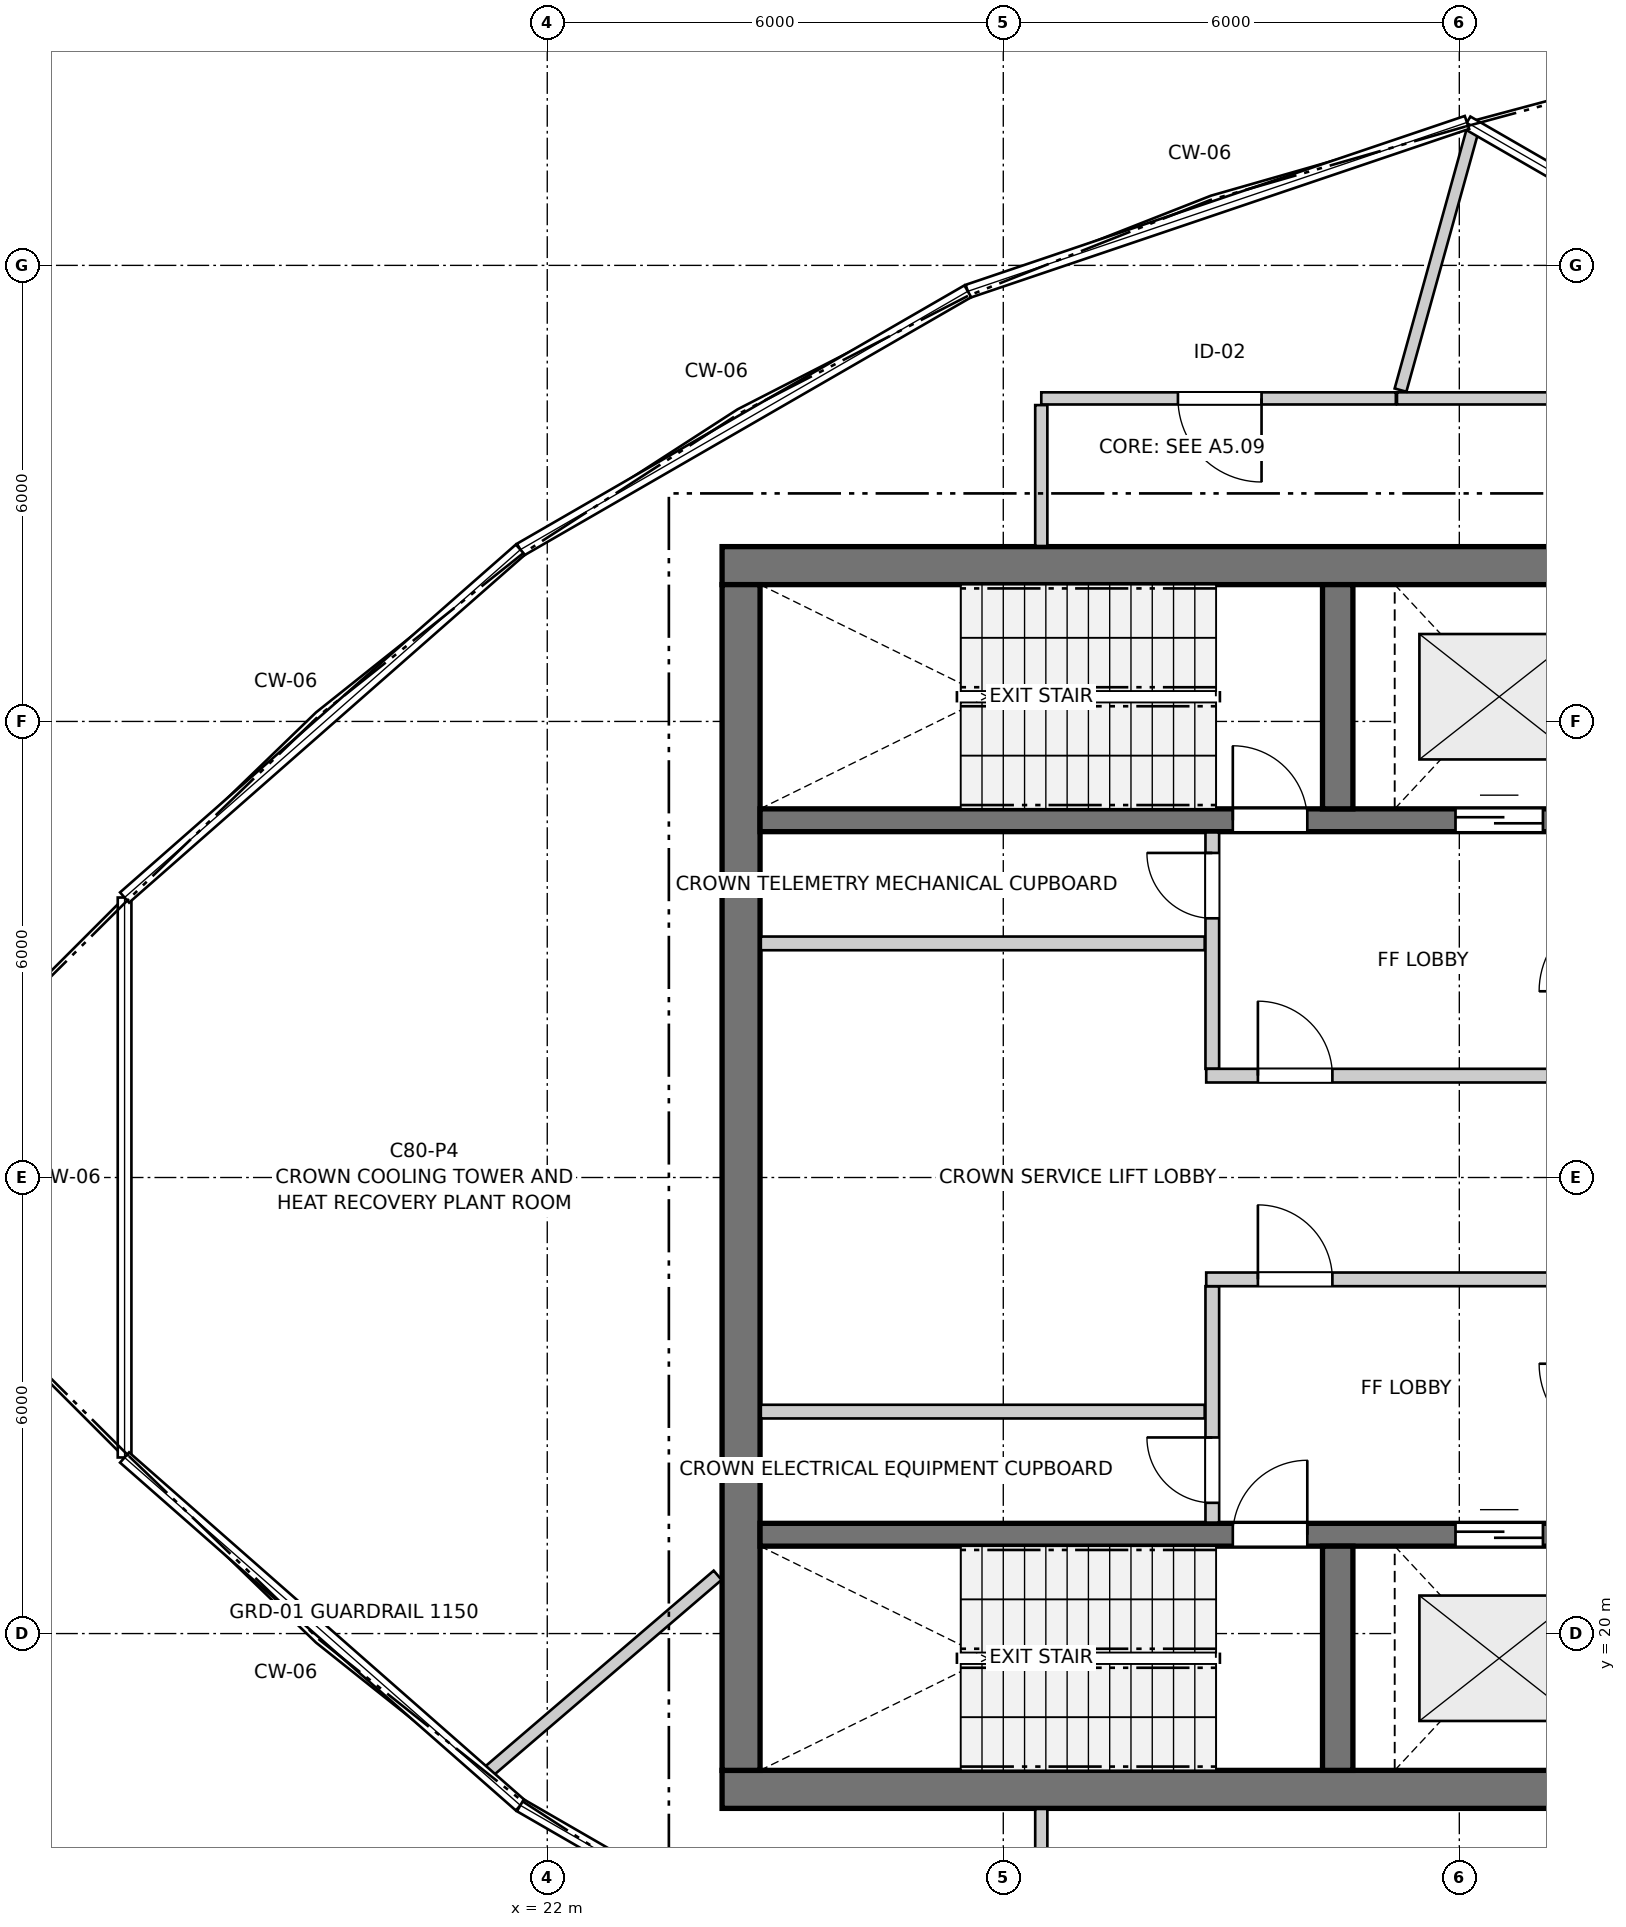
"""IFC4 building model, lengths in metres.
Left out: names, types, materials, properties, quantities, classifications, styles, units other than length and angle.
Written with IfcOpenShell. Run it as: python <this file> out.ifc"""

import sys

from ifc_helpers import new_model, si_unit, direction, frame, frame_2d, origin, place, context, subcontext, project, spatial, rectangle, extrude, source, transform, mapped, element, fill, save


model = new_model("IFC4")
c1 = context("Model", 3, precision=1e-05, world=origin(), true_north=direction((0.0, 1.0)))
c2 = subcontext(c1, "Body", "Model", "MODEL_VIEW")
j1 = project(units=[si_unit("LENGTHUNIT", "METRE"), si_unit("PLANEANGLEUNIT", "RADIAN")], contexts=[c1])
p1 = place(None, origin())
s1 = spatial("IfcSite", under=j1, at=p1, CompositionType="ELEMENT")
p2 = place(p1, origin())
s2 = spatial("IfcBuilding", under=s1, at=p2, CompositionType="ELEMENT")
p3 = place(p2, frame((0.0, 0.0, 270.4)))
s3 = spatial("IfcBuildingStorey", under=s2, at=p3, CompositionType="ELEMENT", Elevation=270.4)
for number, where, z_axis, x_axis in (
    (1, (24.3, 17.95, 0.0), (0.0, 0.0, 1.0), (1.0, 0.0, 0.0)),
    (2, (36.4, 34.05, 0.0), (0.0, 0.0, 1.0), (-1.0, 0.0, 0.0)),
):
    element("IfcWall", number, at=place(p3, frame(where, z_axis=z_axis, x_axis=x_axis)), inside=s3, PredefinedType="SHEAR", context=c2, shape_type="SweptSolid", body=[
        extrude(rectangle(XDim=12.1, YDim=0.5, at=frame_2d((6.05, 0.0))), origin(), (0.0, 0.0, 1.0), 4.05),
    ])
p4 = place(p3, frame((24.55, 33.8, 0.0), z_axis=(0.0, 0.0, 1.0), x_axis=(0.0, -1.0, 0.0)))
e3 = element("IfcWall", 3, at=p4, inside=s3, PredefinedType="SHEAR", context=c2, shape_type="SweptSolid", body=[
    extrude(rectangle(XDim=15.6, YDim=0.5, at=frame_2d((7.8, 0.0))), origin(), (0.0, 0.0, 1.0), 4.05),
])
p5 = place(p3, frame((24.8, 21.3, 0.0), z_axis=(0.0, 0.0, 1.0), x_axis=(1.0, 0.0, 0.0)))
e4 = element("IfcWall", 4, at=p5, inside=s3, PredefinedType="SHEAR", context=c2, shape_type="SweptSolid", body=[
    extrude(rectangle(XDim=11.1, YDim=0.3, at=frame_2d((5.55, 0.0))), origin(), (0.0, 0.0, 1.0), 4.05),
])
p6 = place(p5, frame((6.22, 0.0, 0.0)))
e5 = element("IfcOpeningElement", 5, at=p6, cuts=e4, PredefinedType="OPENING", context=c2, shape_type="SweptSolid", body=[
    extrude(rectangle(XDim=0.98, YDim=2.15, at=frame_2d((0.49, 1.075))), frame((0.0, 0.16, 0.0), z_axis=(0.0, -1.0, 0.0), x_axis=(1.0, 0.0, 0.0)), (0.0, 0.0, 1.0), 0.32),
])
p7 = place(p5, frame((9.15, 0.0, 0.0)))
e6 = element("IfcOpeningElement", 6, at=p7, cuts=e4, PredefinedType="OPENING", context=c2, shape_type="SweptSolid", body=[
    extrude(rectangle(XDim=1.15, YDim=2.15, at=frame_2d((0.575, 1.075))), frame((0.0, 0.16, 0.0), z_axis=(0.0, -1.0, 0.0), x_axis=(1.0, 0.0, 0.0)), (0.0, 0.0, 1.0), 0.32),
])
p8 = place(p3, frame((32.4, 18.2, 0.0), z_axis=(0.0, 0.0, 1.0), x_axis=(0.0, 1.0, 0.0)))
e7 = element("IfcWall", 7, at=p8, inside=s3, PredefinedType="SHEAR", context=c2, shape_type="SweptSolid", body=[
    extrude(rectangle(XDim=2.95, YDim=0.4, at=frame_2d((1.475, 0.0))), origin(), (0.0, 0.0, 1.0), 4.05),
])
p9 = place(p3, frame((24.8, 30.7, 0.0), z_axis=(0.0, 0.0, 1.0), x_axis=(1.0, 0.0, 0.0)))
e8 = element("IfcWall", 8, at=p9, inside=s3, PredefinedType="SHEAR", context=c2, shape_type="SweptSolid", body=[
    extrude(rectangle(XDim=11.1, YDim=0.3, at=frame_2d((5.55, 0.0))), origin(), (0.0, 0.0, 1.0), 4.05),
])
p10 = place(p9, frame((6.22, 0.0, 0.0)))
e9 = element("IfcOpeningElement", 9, at=p10, cuts=e8, PredefinedType="OPENING", context=c2, shape_type="SweptSolid", body=[
    extrude(rectangle(XDim=0.98, YDim=2.15, at=frame_2d((0.49, 1.075))), frame((0.0, 0.16, 0.0), z_axis=(0.0, -1.0, 0.0), x_axis=(1.0, 0.0, 0.0)), (0.0, 0.0, 1.0), 0.32),
])
p11 = place(p9, frame((9.15, 0.0, 0.0)))
e10 = element("IfcOpeningElement", 10, at=p11, cuts=e8, PredefinedType="OPENING", context=c2, shape_type="SweptSolid", body=[
    extrude(rectangle(XDim=1.15, YDim=2.15, at=frame_2d((0.575, 1.075))), frame((0.0, 0.16, 0.0), z_axis=(0.0, -1.0, 0.0), x_axis=(1.0, 0.0, 0.0)), (0.0, 0.0, 1.0), 0.32),
])
p12 = place(p3, frame((32.4, 30.85, 0.0), z_axis=(0.0, 0.0, 1.0), x_axis=(0.0, 1.0, 0.0)))
e11 = element("IfcWall", 11, at=p12, inside=s3, PredefinedType="SHEAR", context=c2, shape_type="SweptSolid", body=[
    extrude(rectangle(XDim=2.95, YDim=0.4, at=frame_2d((1.475, 0.0))), origin(), (0.0, 0.0, 1.0), 4.05),
])
p13 = place(p3, frame((30.75, 21.46, 0.0), z_axis=(0.0, 0.0, 1.0), x_axis=(0.0, 1.0, 0.0)))
e12 = element("IfcWall", 12, at=p13, inside=s3, PredefinedType="PARTITIONING", context=c2, shape_type="SweptSolid", body=[
    extrude(rectangle(XDim=3.11, YDim=0.18, at=frame_2d((1.555, 0.0))), origin(), (0.0, 0.0, 1.0), 4.05),
])
p14 = place(p13, frame((0.26, 0.0, 0.0)))
e13 = element("IfcOpeningElement", 13, at=p14, cuts=e12, PredefinedType="OPENING", context=c2, shape_type="SweptSolid", body=[
    extrude(rectangle(XDim=0.86, YDim=2.05, at=frame_2d((0.43, 1.025))), frame((0.0, 0.1, 0.0), z_axis=(0.0, -1.0, 0.0), x_axis=(1.0, 0.0, 0.0)), (0.0, 0.0, 1.0), 0.2),
])
p15 = place(p3, frame((30.67, 24.66, 0.0), z_axis=(0.0, 0.0, 1.0), x_axis=(1.0, 0.0, 0.0)))
e14 = element("IfcWall", 14, at=p15, inside=s3, PredefinedType="PARTITIONING", context=c2, shape_type="SweptSolid", body=[
    extrude(rectangle(XDim=5.22, YDim=0.18, at=frame_2d((2.61, 0.0))), origin(), (0.0, 0.0, 1.0), 4.05),
])
p16 = place(p15, frame((0.68, 0.0, 0.0)))
e15 = element("IfcOpeningElement", 15, at=p16, cuts=e14, PredefinedType="OPENING", context=c2, shape_type="SweptSolid", body=[
    extrude(rectangle(XDim=0.98, YDim=2.15, at=frame_2d((0.49, 1.075))), frame((0.0, 0.1, 0.0), z_axis=(0.0, -1.0, 0.0), x_axis=(1.0, 0.0, 0.0)), (0.0, 0.0, 1.0), 0.2),
])
p17 = place(p3, frame((30.75, 27.43, 0.0), z_axis=(0.0, 0.0, 1.0), x_axis=(0.0, 1.0, 0.0)))
e16 = element("IfcWall", 16, at=p17, inside=s3, PredefinedType="PARTITIONING", context=c2, shape_type="SweptSolid", body=[
    extrude(rectangle(XDim=3.11, YDim=0.18, at=frame_2d((1.555, 0.0))), origin(), (0.0, 0.0, 1.0), 4.05),
])
p18 = place(p17, frame((1.98, 0.0, 0.0)))
e17 = element("IfcOpeningElement", 17, at=p18, cuts=e16, PredefinedType="OPENING", context=c2, shape_type="SweptSolid", body=[
    extrude(rectangle(XDim=0.86, YDim=2.05, at=frame_2d((0.43, 1.025))), frame((0.0, 0.1, 0.0), z_axis=(0.0, -1.0, 0.0), x_axis=(1.0, 0.0, 0.0)), (0.0, 0.0, 1.0), 0.2),
])
p19 = place(p3, frame((30.67, 27.34, 0.0), z_axis=(0.0, 0.0, 1.0), x_axis=(1.0, 0.0, 0.0)))
e18 = element("IfcWall", 18, at=p19, inside=s3, PredefinedType="PARTITIONING", context=c2, shape_type="SweptSolid", body=[
    extrude(rectangle(XDim=5.22, YDim=0.18, at=frame_2d((2.61, 0.0))), origin(), (0.0, 0.0, 1.0), 4.05),
])
p20 = place(p19, frame((0.68, 0.0, 0.0)))
e19 = element("IfcOpeningElement", 19, at=p20, cuts=e18, PredefinedType="OPENING", context=c2, shape_type="SweptSolid", body=[
    extrude(rectangle(XDim=0.98, YDim=2.15, at=frame_2d((0.49, 1.075))), frame((0.0, 0.1, 0.0), z_axis=(0.0, -1.0, 0.0), x_axis=(1.0, 0.0, 0.0)), (0.0, 0.0, 1.0), 0.2),
])
for number, where, z_axis, x_axis in (
    (20, (24.81, 22.92, 0.0), (0.0, 0.0, 1.0), (1.0, 0.0, 0.0)),
    (21, (24.81, 29.08, 0.0), (0.0, 0.0, 1.0), (1.0, 0.0, 0.0)),
):
    element("IfcWall", number, at=place(p3, frame(where, z_axis=z_axis, x_axis=x_axis)), inside=s3, PredefinedType="PARTITIONING", context=c2, shape_type="SweptSolid", body=[
        extrude(rectangle(XDim=5.84, YDim=0.18, at=frame_2d((2.92, 0.0))), origin(), (0.0, 0.0, 1.0), 4.05),
    ])
p21 = place(p3, frame((33.165, 36.25, 0.0), z_axis=(0.0, 0.0, 1.0), x_axis=(-1.0, 0.0, 0.0)))
e22 = element("IfcWall", 22, at=p21, inside=s3, PredefinedType="PARTITIONING", context=c2, shape_type="SweptSolid", body=[
    extrude(rectangle(XDim=4.665, YDim=0.16, at=frame_2d((2.333, 0.0))), origin(), (0.0, 0.0, 1.0), 4.05),
])
p22 = place(p21, frame((1.767, 0.0, 0.0)))
e23 = element("IfcOpeningElement", 23, at=p22, cuts=e22, PredefinedType="OPENING", context=c2, shape_type="SweptSolid", body=[
    extrude(rectangle(XDim=1.1, YDim=2.15, at=frame_2d((0.55, 1.075))), frame((0.0, 0.09, 0.0), z_axis=(0.0, -1.0, 0.0), x_axis=(1.0, 0.0, 0.0)), (0.0, 0.0, 1.0), 0.18),
])
p23 = place(p3, frame((33.18, 36.25, 0.0), z_axis=(0.0, 0.0, 1.0), x_axis=(1.0, 0.0, 0.0)))
e24 = element("IfcWall", 24, at=p23, inside=s3, PredefinedType="PARTITIONING", context=c2, shape_type="SweptSolid", body=[
    extrude(rectangle(XDim=5.382, YDim=0.16, at=frame_2d((2.691, 0.0))), origin(), (0.0, 0.0, 1.0), 4.05),
])
p24 = place(p3, frame((21.204, 18.164, 0.0), z_axis=(0.0, 0.0, 1.0), x_axis=(0.759364296086, 0.650665709739, 0.0)))
e25 = element("IfcWall", 25, at=p24, inside=s3, PredefinedType="PARTITIONING", context=c2, shape_type="SweptSolid", body=[
    extrude(rectangle(XDim=4.0, YDim=0.16, at=frame_2d((2.0, 0.0))), origin(), (0.0, 0.0, 1.0), 4.05),
])
p25 = place(p3, frame((33.226, 36.359, 0.0), z_axis=(0.0, 0.0, 1.0), x_axis=(0.267305613855, 0.963611803997, 0.0)))
e26 = element("IfcWall", 26, at=p25, inside=s3, PredefinedType="PARTITIONING", context=c2, shape_type="SweptSolid", body=[
    extrude(rectangle(XDim=3.574, YDim=0.16, at=frame_2d((1.787, 0.0))), origin(), (0.0, 0.0, 1.0), 3.318),
])
for number, where, z_axis, x_axis in (
    (27, (28.5, 34.308, 0.0), (0.0, 0.0, 1.0), (0.0, 1.0, 0.0)),
    (28, (28.5, 15.838, 0.0), (0.0, 0.0, 1.0), (0.0, 1.0, 0.0)),
):
    element("IfcWall", number, at=place(p3, frame(where, z_axis=z_axis, x_axis=x_axis)), inside=s3, PredefinedType="PARTITIONING", context=c2, shape_type="SweptSolid", body=[
        extrude(rectangle(XDim=1.854, YDim=0.16, at=frame_2d((0.927, 0.0))), origin(), (0.0, 0.0, 1.0), 3.318),
    ])
m1 = source(origin(), c2, "Body", "SweptSolid", [
    extrude(rectangle(XDim=0.98, YDim=2.15, at=frame_2d((0.49, 1.075))), frame((0.0, 0.025, 0.0), z_axis=(0.0, -1.0, 0.0), x_axis=(1.0, 0.0, 0.0)), (0.0, 0.0, 1.0), 0.05),
])
p26 = place(p6, origin())
e29 = element("IfcDoor", 29, at=p26, inside=s3, OperationType="SINGLE_SWING_RIGHT", PredefinedType="DOOR", context=c2, shape_type="MappedRepresentation", body=[
    mapped(m1, transform((0.0, 0.0, 0.0), x_axis=(1.0, 0.0, 0.0), y_axis=(0.0, 1.0, 0.0), z_axis=(0.0, 0.0, 1.0), scale=1.0)),
])
fill(e5, e29)
m2 = source(origin(), c2, "Body", "SweptSolid", [
    extrude(rectangle(XDim=1.15, YDim=2.15, at=frame_2d((0.575, 1.075))), frame((0.0, 0.025, 0.0), z_axis=(0.0, -1.0, 0.0), x_axis=(1.0, 0.0, 0.0)), (0.0, 0.0, 1.0), 0.05),
])
p27 = place(p7, origin())
e30 = element("IfcDoor", 30, at=p27, inside=s3, OperationType="DOUBLE_DOOR_SLIDING", PredefinedType="DOOR", context=c2, shape_type="MappedRepresentation", body=[
    mapped(m2, transform((0.0, 0.0, 0.0), x_axis=(1.0, 0.0, 0.0), y_axis=(0.0, 1.0, 0.0), z_axis=(0.0, 0.0, 1.0), scale=1.0)),
])
fill(e6, e30)
p28 = place(p10, origin())
e31 = element("IfcDoor", 31, at=p28, inside=s3, OperationType="SINGLE_SWING_LEFT", PredefinedType="DOOR", context=c2, shape_type="MappedRepresentation", body=[
    mapped(m1, transform((0.0, 0.0, 0.0), x_axis=(1.0, 0.0, 0.0), y_axis=(0.0, 1.0, 0.0), z_axis=(0.0, 0.0, 1.0), scale=1.0)),
])
fill(e9, e31)
p29 = place(p11, origin())
e32 = element("IfcDoor", 32, at=p29, inside=s3, OperationType="DOUBLE_DOOR_SLIDING", PredefinedType="DOOR", context=c2, shape_type="MappedRepresentation", body=[
    mapped(m2, transform((0.0, 0.0, 0.0), x_axis=(1.0, 0.0, 0.0), y_axis=(0.0, 1.0, 0.0), z_axis=(0.0, 0.0, 1.0), scale=1.0)),
])
fill(e10, e32)
m3 = source(origin(), c2, "Body", "SweptSolid", [
    extrude(rectangle(XDim=0.86, YDim=2.05, at=frame_2d((0.43, 1.025))), frame((0.0, 0.025, 0.0), z_axis=(0.0, -1.0, 0.0), x_axis=(1.0, 0.0, 0.0)), (0.0, 0.0, 1.0), 0.05),
])
p30 = place(p14, origin())
e33 = element("IfcDoor", 33, at=p30, inside=s3, OperationType="SINGLE_SWING_RIGHT", PredefinedType="DOOR", context=c2, shape_type="MappedRepresentation", body=[
    mapped(m3, transform((0.0, 0.0, 0.0), x_axis=(1.0, 0.0, 0.0), y_axis=(0.0, 1.0, 0.0), z_axis=(0.0, 0.0, 1.0), scale=1.0)),
])
fill(e13, e33)
p31 = place(p16, origin())
e34 = element("IfcDoor", 34, at=p31, inside=s3, OperationType="SINGLE_SWING_LEFT", PredefinedType="DOOR", context=c2, shape_type="MappedRepresentation", body=[
    mapped(m1, transform((0.0, 0.0, 0.0), x_axis=(1.0, 0.0, 0.0), y_axis=(0.0, 1.0, 0.0), z_axis=(0.0, 0.0, 1.0), scale=1.0)),
])
fill(e15, e34)
p32 = place(p18, origin())
e35 = element("IfcDoor", 35, at=p32, inside=s3, OperationType="SINGLE_SWING_RIGHT", PredefinedType="DOOR", context=c2, shape_type="MappedRepresentation", body=[
    mapped(m3, transform((0.0, 0.0, 0.0), x_axis=(1.0, 0.0, 0.0), y_axis=(0.0, 1.0, 0.0), z_axis=(0.0, 0.0, 1.0), scale=1.0)),
])
fill(e17, e35)
p33 = place(p20, origin())
e36 = element("IfcDoor", 36, at=p33, inside=s3, OperationType="SINGLE_SWING_LEFT", PredefinedType="DOOR", context=c2, shape_type="MappedRepresentation", body=[
    mapped(m1, transform((0.0, 0.0, 0.0), x_axis=(1.0, 0.0, 0.0), y_axis=(0.0, 1.0, 0.0), z_axis=(0.0, 0.0, 1.0), scale=1.0)),
])
fill(e19, e36)
m4 = source(origin(), c2, "Body", "SweptSolid", [
    extrude(rectangle(XDim=1.1, YDim=2.15, at=frame_2d((0.55, 1.075))), frame((0.0, 0.025, 0.0), z_axis=(0.0, -1.0, 0.0), x_axis=(1.0, 0.0, 0.0)), (0.0, 0.0, 1.0), 0.05),
])
p34 = place(p22, origin())
e37 = element("IfcDoor", 37, at=p34, inside=s3, OperationType="SINGLE_SWING_LEFT", PredefinedType="DOOR", context=c2, shape_type="MappedRepresentation", body=[
    mapped(m4, transform((0.0, 0.0, 0.0), x_axis=(1.0, 0.0, 0.0), y_axis=(0.0, 1.0, 0.0), z_axis=(0.0, 0.0, 1.0), scale=1.0)),
])
fill(e23, e37)
save(model, sys.argv[1])
